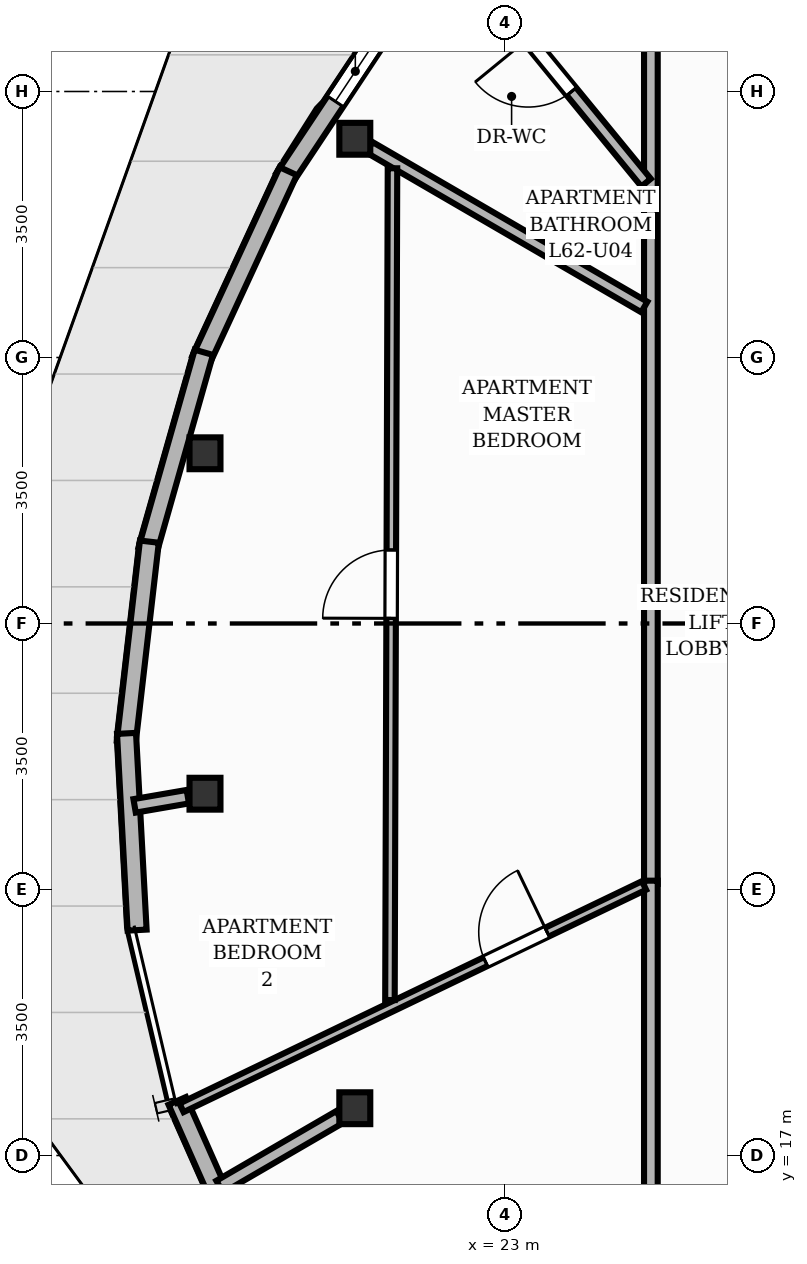
"""IFC4 building model, lengths in metres.
Left out: names, types, materials, properties, quantities, classifications, styles, units other than length and angle.
Written with IfcOpenShell. Run it as: python <this file> out.ifc"""

import sys

from ifc_helpers import new_model, si_unit, direction, frame, frame_2d, origin, origin_2d, place, context, subcontext, project, spatial, rectangle, i_section, extrude, element, fill, save


model = new_model("IFC4")
c1 = context("Model", 3, precision=1e-05, world=origin(), true_north=direction((0.0, 1.0)))
c2 = subcontext(c1, "Body", "Model", "MODEL_VIEW")
j1 = project(units=[si_unit("LENGTHUNIT", "METRE"), si_unit("PLANEANGLEUNIT", "RADIAN")], contexts=[c1])
p1 = place(None, origin())
s1 = spatial("IfcSite", under=j1, at=p1, CompositionType="ELEMENT")
p2 = place(p1, origin())
s2 = spatial("IfcBuilding", under=s1, at=p2, CompositionType="ELEMENT")
p3 = place(p2, frame((0.0, 0.0, 207.84)))
s3 = spatial("IfcBuildingStorey", under=s2, at=p3, CompositionType="ELEMENT", Elevation=207.84)
for number, where, z_axis, x_axis in (
    (1, (21.025, 30.378, 0.0), (0.0, 0.0, 1.0), (1.0, 0.0, 0.0)),
    (2, (19.054, 26.24, 0.0), (0.0, 0.0, 1.0), (1.0, 0.0, 0.0)),
    (3, (19.054, 21.76, 0.0), (0.0, 0.0, 1.0), (1.0, 0.0, 0.0)),
    (4, (21.025, 17.622, 0.0), (0.0, 0.0, 1.0), (1.0, 0.0, 0.0)),
):
    element("IfcColumn", number, at=place(p3, frame(where, z_axis=z_axis, x_axis=x_axis)), inside=s3, PredefinedType="COLUMN", context=c2, shape_type="SweptSolid", body=[
        extrude(i_section(OverallWidth=0.407, OverallDepth=0.419, WebThickness=0.031, FlangeThickness=0.049, at=origin_2d()), origin(), (0.0, 0.0, 1.0), 3.2),
    ])
p4 = place(p3, frame((20.096, 29.856, 0.0), z_axis=(0.0, 0.0, 1.0), x_axis=(0.553003487622, 0.83317893797, 0.0)))
e5 = element("IfcWall", 5, at=p4, inside=s3, PredefinedType="SOLIDWALL", context=c2, shape_type="SweptSolid", body=[
    extrude(rectangle(XDim=2.758, YDim=0.25, at=frame_2d((1.379, 0.0))), origin(), (0.0, 0.0, 1.0), 2.96),
])
p5 = place(p4, frame((1.216, 0.0, 0.85)))
e6 = element("IfcOpeningElement", 6, at=p5, cuts=e5, PredefinedType="OPENING", context=c2, shape_type="SweptSolid", body=[
    extrude(rectangle(XDim=0.95, YDim=1.45, at=frame_2d((0.475, 0.725))), frame((0.0, 0.135, 0.0), z_axis=(0.0, -1.0, 0.0), x_axis=(1.0, 0.0, 0.0)), (0.0, 0.0, 1.0), 0.27),
])
p6 = place(p3, frame((19.0, 27.466, 0.0), z_axis=(0.0, 0.0, 1.0), x_axis=(0.419544316157, 0.907734854889, 0.0)))
e7 = element("IfcWall", 7, at=p6, inside=s3, PredefinedType="SOLIDWALL", context=c2, shape_type="SweptSolid", body=[
    extrude(rectangle(XDim=2.739, YDim=0.25, at=frame_2d((1.369, 0.0))), origin(), (0.0, 0.0, 1.0), 2.96),
])
p7 = place(p3, frame((18.301, 24.969, 0.0), z_axis=(0.0, 0.0, 1.0), x_axis=(0.273097490466, 0.961986362014, 0.0)))
e8 = element("IfcWall", 8, at=p7, inside=s3, PredefinedType="SOLIDWALL", context=c2, shape_type="SweptSolid", body=[
    extrude(rectangle(XDim=2.702, YDim=0.25, at=frame_2d((1.351, 0.0))), origin(), (0.0, 0.0, 1.0), 2.577),
])
p8 = place(p3, frame((18.018, 22.443, 0.0), z_axis=(0.0, 0.0, 1.0), x_axis=(0.114746448117, 0.993394812068, 0.0)))
e9 = element("IfcWall", 9, at=p8, inside=s3, PredefinedType="SOLIDWALL", context=c2, shape_type="SweptSolid", body=[
    extrude(rectangle(XDim=2.651, YDim=0.25, at=frame_2d((1.326, 0.0))), origin(), (0.0, 0.0, 1.0), 2.96),
])
p9 = place(p3, frame((18.161, 19.966, 0.0), z_axis=(0.0, 0.0, 1.0), x_axis=(-0.053868666674, 0.998548029266, 0.0)))
e10 = element("IfcWall", 10, at=p9, inside=s3, PredefinedType="SOLIDWALL", context=c2, shape_type="SweptSolid", body=[
    extrude(rectangle(XDim=2.592, YDim=0.25, at=frame_2d((1.296, 0.0))), origin(), (0.0, 0.0, 1.0), 2.96),
])
p10 = place(p3, frame((19.691, 15.452, 0.0), z_axis=(0.0, 0.0, 1.0), x_axis=(-0.404748462651, 0.91442806277, 0.0)))
e11 = element("IfcWall", 11, at=p10, inside=s3, PredefinedType="SOLIDWALL", context=c2, shape_type="SweptSolid", body=[
    extrude(rectangle(XDim=2.478, YDim=0.25, at=frame_2d((1.239, 0.0))), origin(), (0.0, 0.0, 1.0), 2.96),
])
p11 = place(p3, frame((18.827, 21.721, 0.0), z_axis=(0.0, 0.0, 1.0), x_axis=(-0.985352727868, -0.170528594914, 0.0)))
e12 = element("IfcWall", 12, at=p11, inside=s3, PredefinedType="PARTITIONING", context=c2, shape_type="SweptSolid", body=[
    extrude(rectangle(XDim=0.71, YDim=0.18, at=frame_2d((0.355, 0.0))), origin(), (0.0, 0.0, 1.0), 2.403),
])
p12 = place(p3, frame((20.826, 17.507, 0.0), z_axis=(0.0, 0.0, 1.0), x_axis=(-0.864597744878, -0.502464664979, 0.0)))
e13 = element("IfcWall", 13, at=p12, inside=s3, PredefinedType="PARTITIONING", context=c2, shape_type="SweptSolid", body=[
    extrude(rectangle(XDim=1.825, YDim=0.18, at=frame_2d((0.913, 0.0))), origin(), (0.0, 0.0, 1.0), 2.403),
])
p13 = place(p3, frame((24.92, 20.574, 0.0), z_axis=(0.0, 0.0, 1.0), x_axis=(0.0, 1.0, 0.0)))
e14 = element("IfcWall", 14, at=p13, inside=s3, PredefinedType="PARTITIONING", context=c2, shape_type="SweptSolid", body=[
    extrude(rectangle(XDim=12.006, YDim=0.18, at=frame_2d((6.003, 0.0))), origin(), (0.0, 0.0, 1.0), 2.955),
])
p14 = place(p3, frame((24.92, 15.48, 0.0), z_axis=(0.0, 0.0, 1.0), x_axis=(0.0, 1.0, 0.0)))
e15 = element("IfcWall", 15, at=p14, inside=s3, PredefinedType="PARTITIONING", context=c2, shape_type="SweptSolid", body=[
    extrude(rectangle(XDim=5.136, YDim=0.18, at=frame_2d((2.568, 0.0))), origin(), (0.0, 0.0, 1.0), 2.955),
])
p15 = place(p3, frame((24.857, 29.801, 0.0), z_axis=(0.0, 0.0, 1.0), x_axis=(-0.63363022253, 0.773636052092, 0.0)))
e16 = element("IfcWall", 16, at=p15, inside=s3, PredefinedType="PLUMBINGWALL", context=c2, shape_type="SweptSolid", body=[
    extrude(rectangle(XDim=3.997, YDim=0.16, at=frame_2d((1.999, 0.0))), origin(), (0.0, 0.0, 1.0), 2.955),
])
p16 = place(p15, frame((1.548, 0.0, 0.0)))
e17 = element("IfcOpeningElement", 17, at=p16, cuts=e16, PredefinedType="OPENING", context=c2, shape_type="SweptSolid", body=[
    extrude(rectangle(XDim=0.9, YDim=2.1, at=frame_2d((0.45, 1.05))), frame((0.0, 0.09, 0.0), z_axis=(0.0, -1.0, 0.0), x_axis=(1.0, 0.0, 0.0)), (0.0, 0.0, 1.0), 0.18),
])
p17 = place(p3, frame((24.833, 28.164, 0.0), z_axis=(0.0, 0.0, 1.0), x_axis=(-0.864609810713, 0.502443902559, 0.0)))
e18 = element("IfcWall", 18, at=p17, inside=s3, PredefinedType="PLUMBINGWALL", context=c2, shape_type="SweptSolid", body=[
    extrude(rectangle(XDim=4.182, YDim=0.16, at=frame_2d((2.091, 0.0))), origin(), (0.0, 0.0, 1.0), 2.403),
])
p18 = place(p3, frame((18.745, 17.627, 0.0), z_axis=(0.0, 0.0, 1.0), x_axis=(0.901255411719, 0.433288221451, 0.0)))
e19 = element("IfcWall", 19, at=p18, inside=s3, PredefinedType="PARTITIONING", context=c2, shape_type="SweptSolid", body=[
    extrude(rectangle(XDim=6.751, YDim=0.125, at=frame_2d((3.376, 0.0))), origin(), (0.0, 0.0, 1.0), 2.955),
])
p19 = place(p18, frame((4.437, 0.0, 0.0)))
e20 = element("IfcOpeningElement", 20, at=p19, cuts=e19, PredefinedType="OPENING", context=c2, shape_type="SweptSolid", body=[
    extrude(rectangle(XDim=0.9, YDim=2.1, at=frame_2d((0.45, 1.05))), frame((0.0, 0.073, 0.0), z_axis=(0.0, -1.0, 0.0), x_axis=(1.0, 0.0, 0.0)), (0.0, 0.0, 1.0), 0.145),
])
p20 = place(p3, frame((21.487, 19.045, 0.0), z_axis=(0.0, 0.0, 1.0), x_axis=(0.003056179539, 0.999995329872, 0.0)))
e21 = element("IfcWall", 21, at=p20, inside=s3, PredefinedType="PARTITIONING", context=c2, shape_type="SweptSolid", body=[
    extrude(rectangle(XDim=10.944, YDim=0.125, at=frame_2d((5.472, 0.0))), origin(), (0.0, 0.0, 1.0), 2.955),
])
p21 = place(p20, frame((5.022, 0.0, 0.0)))
e22 = element("IfcOpeningElement", 22, at=p21, cuts=e21, PredefinedType="OPENING", context=c2, shape_type="SweptSolid", body=[
    extrude(rectangle(XDim=0.9, YDim=2.1, at=frame_2d((0.45, 1.05))), frame((0.0, 0.073, 0.0), z_axis=(0.0, -1.0, 0.0), x_axis=(1.0, 0.0, 0.0)), (0.0, 0.0, 1.0), 0.145),
])
p22 = place(p5, origin())
e23 = element("IfcWindow", 23, at=p22, inside=s3, PartitioningType="SINGLE_PANEL", PredefinedType="WINDOW", context=c2, shape_type="SweptSolid", body=[
    extrude(rectangle(XDim=0.95, YDim=1.45, at=frame_2d((0.475, 0.725))), frame((0.0, 0.03, 0.0), z_axis=(0.0, -1.0, 0.0), x_axis=(1.0, 0.0, 0.0)), (0.0, 0.0, 1.0), 0.06),
])
fill(e6, e23)
p23 = place(p16, origin())
e24 = element("IfcDoor", 24, at=p23, inside=s3, OperationType="SINGLE_SWING_RIGHT", PredefinedType="DOOR", context=c2, shape_type="SweptSolid", body=[
    extrude(rectangle(XDim=0.9, YDim=2.1, at=frame_2d((0.45, 1.05))), frame((0.0, 0.025, 0.0), z_axis=(0.0, -1.0, 0.0), x_axis=(1.0, 0.0, 0.0)), (0.0, 0.0, 1.0), 0.05),
])
fill(e17, e24)
p24 = place(p19, origin())
e25 = element("IfcDoor", 25, at=p24, inside=s3, OperationType="SINGLE_SWING_RIGHT", PredefinedType="DOOR", context=c2, shape_type="SweptSolid", body=[
    extrude(rectangle(XDim=0.9, YDim=2.1, at=frame_2d((0.45, 1.05))), frame((0.0, 0.025, 0.0), z_axis=(0.0, -1.0, 0.0), x_axis=(1.0, 0.0, 0.0)), (0.0, 0.0, 1.0), 0.05),
])
fill(e20, e25)
p25 = place(p21, origin())
e26 = element("IfcDoor", 26, at=p25, inside=s3, OperationType="SINGLE_SWING_LEFT", PredefinedType="DOOR", context=c2, shape_type="SweptSolid", body=[
    extrude(rectangle(XDim=0.9, YDim=2.1, at=frame_2d((0.45, 1.05))), frame((0.0, 0.025, 0.0), z_axis=(0.0, -1.0, 0.0), x_axis=(1.0, 0.0, 0.0)), (0.0, 0.0, 1.0), 0.05),
])
fill(e22, e26)
save(model, sys.argv[1])
